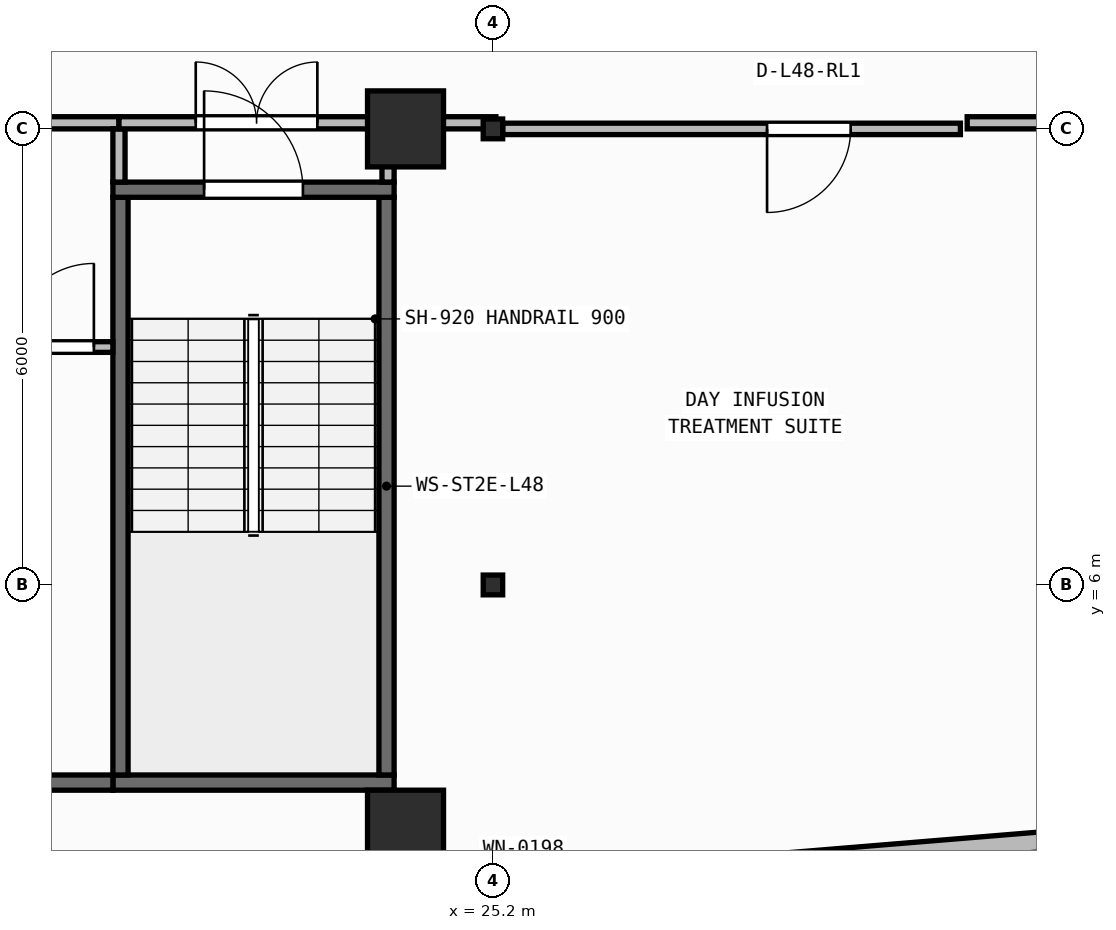
"""IFC4 building model, lengths in metres.
Left out: names, types, materials, properties, quantities, classifications, styles, units other than length and angle.
Written with IfcOpenShell. Run it as: python <this file> out.ifc"""

import sys

from ifc_helpers import new_model, si_unit, direction, frame, frame_2d, origin, origin_2d, place, context, subcontext, project, spatial, rectangle, i_section, extrude, element, fill, save


model = new_model("IFC4")
c1 = context("Model", 3, precision=1e-05, world=origin(), true_north=direction((0.0, 1.0)))
c2 = subcontext(c1, "Body", "Model", "MODEL_VIEW")
j1 = project(units=[si_unit("LENGTHUNIT", "METRE"), si_unit("PLANEANGLEUNIT", "RADIAN")], contexts=[c1])
p1 = place(None, origin())
s1 = spatial("IfcSite", under=j1, at=p1, CompositionType="ELEMENT")
p2 = place(p1, origin())
s2 = spatial("IfcBuilding", under=s1, at=p2, CompositionType="ELEMENT")
p3 = place(p2, frame((0.0, 0.0, 196.05)))
s3 = spatial("IfcBuildingStorey", under=s2, at=p3, CompositionType="ELEMENT", Elevation=196.05)
p4 = place(p3, frame((24.05, 2.8, 0.0), z_axis=(0.0, 0.0, 1.0), x_axis=(1.0, 0.0, 0.0)))
e1 = element("IfcColumn", 1, at=p4, inside=s3, PredefinedType="COLUMN", context=c2, shape_type="SweptSolid", body=[
    extrude(rectangle(XDim=1.0, YDim=1.0, at=origin_2d()), origin(), (0.0, 0.0, 1.0), 3.95),
])
p5 = place(p3, frame((25.2, 6.0, 0.0), z_axis=(0.0, 0.0, 1.0), x_axis=(1.0, 0.0, 0.0)))
e2 = element("IfcColumn", 2, at=p5, inside=s3, PredefinedType="COLUMN", context=c2, shape_type="SweptSolid", body=[
    extrude(i_section(OverallWidth=0.256, OverallDepth=0.26, WebThickness=0.01, FlangeThickness=0.017, FilletRadius=0.013, at=origin_2d()), origin(), (0.0, 0.0, 1.0), 3.95),
])
p6 = place(p3, frame((24.05, 12.0, 0.0), z_axis=(0.0, 0.0, 1.0), x_axis=(1.0, 0.0, 0.0)))
e3 = element("IfcColumn", 3, at=p6, inside=s3, PredefinedType="COLUMN", context=c2, shape_type="SweptSolid", body=[
    extrude(rectangle(XDim=1.0, YDim=1.0, at=origin_2d()), origin(), (0.0, 0.0, 1.0), 3.95),
])
p7 = place(p3, frame((25.2, 12.0, 0.0), z_axis=(0.0, 0.0, 1.0), x_axis=(1.0, 0.0, 0.0)))
e4 = element("IfcColumn", 4, at=p7, inside=s3, PredefinedType="COLUMN", context=c2, shape_type="SweptSolid", body=[
    extrude(i_section(OverallWidth=0.256, OverallDepth=0.26, WebThickness=0.01, FlangeThickness=0.017, FilletRadius=0.013, at=origin_2d()), origin(), (0.0, 0.0, 1.0), 3.95),
])
p8 = place(p3, frame((2.66, 0.174, 0.0), z_axis=(0.0, 0.0, 1.0), x_axis=(0.996634028439, 0.081979347142, 0.0)))
e5 = element("IfcWall", 5, at=p8, inside=s3, PredefinedType="STANDARD", context=c2, shape_type="SweptSolid", body=[
    extrude(rectangle(XDim=46.035, YDim=0.26, at=frame_2d((23.018, 0.0))), origin(), (0.0, 0.0, 1.0), 3.71),
])
p9 = place(p8, frame((21.817, 0.0, 0.9)))
e6 = element("IfcOpeningElement", 6, at=p9, cuts=e5, PredefinedType="OPENING", context=c2, shape_type="SweptSolid", body=[
    extrude(rectangle(XDim=2.4, YDim=1.65, at=frame_2d((1.2, 0.825))), frame((0.0, 0.14, 0.0), z_axis=(0.0, -1.0, 0.0), x_axis=(1.0, 0.0, 0.0)), (0.0, 0.0, 1.0), 0.28),
])
p10 = place(p3, frame((20.2, 3.4, 0.0), z_axis=(0.0, 0.0, 1.0), x_axis=(1.0, 0.0, 0.0)))
e7 = element("IfcWall", 7, at=p10, inside=s3, PredefinedType="SHEAR", context=c2, shape_type="SweptSolid", body=[
    extrude(rectangle(XDim=3.7, YDim=0.2, at=frame_2d((1.85, 0.0))), origin(), (0.0, 0.0, 1.0), 3.71),
])
for number, where, z_axis, x_axis in (
    (8, (20.3, 3.5, 0.0), (0.0, 0.0, 1.0), (0.0, 1.0, 0.0)),
    (9, (23.8, 3.5, 0.0), (0.0, 0.0, 1.0), (0.0, 1.0, 0.0)),
):
    element("IfcWall", number, at=place(p3, frame(where, z_axis=z_axis, x_axis=x_axis)), inside=s3, PredefinedType="SHEAR", context=c2, shape_type="SweptSolid", body=[
        extrude(rectangle(XDim=7.6, YDim=0.2, at=frame_2d((3.8, 0.0))), origin(), (0.0, 0.0, 1.0), 3.71),
    ])
p11 = place(p3, frame((20.2, 11.2, 0.0), z_axis=(0.0, 0.0, 1.0), x_axis=(1.0, 0.0, 0.0)))
e10 = element("IfcWall", 10, at=p11, inside=s3, PredefinedType="SHEAR", context=c2, shape_type="SweptSolid", body=[
    extrude(rectangle(XDim=3.7, YDim=0.2, at=frame_2d((1.85, 0.0))), origin(), (0.0, 0.0, 1.0), 3.71),
])
p12 = place(p11, frame((1.2, 0.0, 0.0)))
e11 = element("IfcOpeningElement", 11, at=p12, cuts=e10, PredefinedType="OPENING", context=c2, shape_type="SweptSolid", body=[
    extrude(rectangle(XDim=1.3, YDim=2.15, at=frame_2d((0.65, 1.075))), frame((0.0, 0.11, 0.0), z_axis=(0.0, -1.0, 0.0), x_axis=(1.0, 0.0, 0.0)), (0.0, 0.0, 1.0), 0.22),
])
p13 = place(p3, frame((6.5, 3.4, 0.0), z_axis=(0.0, 0.0, 1.0), x_axis=(1.0, 0.0, 0.0)))
e12 = element("IfcWall", 12, at=p13, inside=s3, PredefinedType="SHEAR", context=c2, shape_type="SweptSolid", body=[
    extrude(rectangle(XDim=13.7, YDim=0.2, at=frame_2d((6.85, 0.0))), origin(), (0.0, 0.0, 1.0), 3.71),
])
p14 = place(p3, frame((18.61, 9.13, 0.0), z_axis=(0.0, 0.0, 1.0), x_axis=(1.0, 0.0, 0.0)))
e13 = element("IfcWall", 13, at=p14, inside=s3, PredefinedType="PARTITIONING", context=c2, shape_type="SweptSolid", body=[
    extrude(rectangle(XDim=1.59, YDim=0.14, at=frame_2d((0.795, 0.0))), origin(), (0.0, 0.0, 1.0), 3.71),
])
p15 = place(p14, frame((0.24, 0.0, 0.0)))
e14 = element("IfcOpeningElement", 14, at=p15, cuts=e13, PredefinedType="OPENING", context=c2, shape_type="SweptSolid", body=[
    extrude(rectangle(XDim=1.1, YDim=2.1, at=frame_2d((0.55, 1.05))), frame((0.0, 0.08, 0.0), z_axis=(0.0, -1.0, 0.0), x_axis=(1.0, 0.0, 0.0)), (0.0, 0.0, 1.0), 0.16),
])
p16 = place(p3, frame((12.58, 12.08, 0.0), z_axis=(0.0, 0.0, 1.0), x_axis=(1.0, 0.0, 0.0)))
e15 = element("IfcWall", 15, at=p16, inside=s3, PredefinedType="PARTITIONING", context=c2, shape_type="SweptSolid", body=[
    extrude(rectangle(XDim=7.7, YDim=0.16, at=frame_2d((3.85, 0.0))), origin(), (0.0, 0.0, 1.0), 3.152),
])
p17 = place(p16, frame((3.05, 0.0, 0.0)))
e16 = element("IfcOpeningElement", 16, at=p17, cuts=e15, PredefinedType="OPENING", context=c2, shape_type="SweptSolid", body=[
    extrude(rectangle(XDim=1.6, YDim=2.05, at=frame_2d((0.8, 1.025))), frame((0.0, 0.09, 0.0), z_axis=(0.0, -1.0, 0.0), x_axis=(1.0, 0.0, 0.0)), (0.0, 0.0, 1.0), 0.18),
])
p18 = place(p3, frame((20.28, 11.3, 0.0), z_axis=(0.0, 0.0, 1.0), x_axis=(0.0, 1.0, 0.0)))
e17 = element("IfcWall", 17, at=p18, inside=s3, PredefinedType="PARTITIONING", context=c2, shape_type="SweptSolid", body=[
    extrude(rectangle(XDim=0.7, YDim=0.16, at=frame_2d((0.35, 0.0))), origin(), (0.0, 0.0, 1.0), 3.71),
])
p19 = place(p3, frame((20.28, 12.08, 0.0), z_axis=(0.0, 0.0, 1.0), x_axis=(1.0, 0.0, 0.0)))
e18 = element("IfcWall", 18, at=p19, inside=s3, PredefinedType="PARTITIONING", context=c2, shape_type="SweptSolid", body=[
    extrude(rectangle(XDim=3.62, YDim=0.16, at=frame_2d((1.81, 0.0))), origin(), (0.0, 0.0, 1.0), 3.152),
])
p20 = place(p19, frame((1.01, 0.0, 0.0)))
e19 = element("IfcOpeningElement", 19, at=p20, cuts=e18, PredefinedType="OPENING", context=c2, shape_type="SweptSolid", body=[
    extrude(rectangle(XDim=1.6, YDim=2.05, at=frame_2d((0.8, 1.025))), frame((0.0, 0.09, 0.0), z_axis=(0.0, -1.0, 0.0), x_axis=(1.0, 0.0, 0.0)), (0.0, 0.0, 1.0), 0.18),
])
p21 = place(p3, frame((23.82, 11.3, 0.0), z_axis=(0.0, 0.0, 1.0), x_axis=(0.0, 1.0, 0.0)))
e20 = element("IfcWall", 20, at=p21, inside=s3, PredefinedType="PARTITIONING", context=c2, shape_type="SweptSolid", body=[
    extrude(rectangle(XDim=0.7, YDim=0.16, at=frame_2d((0.35, 0.0))), origin(), (0.0, 0.0, 1.0), 3.71),
])
p22 = place(p3, frame((31.35, 12.0, 0.0), z_axis=(0.0, 0.0, 1.0), x_axis=(-1.0, 0.0, 0.0)))
e21 = element("IfcWall", 21, at=p22, inside=s3, PredefinedType="PARTITIONING", context=c2, shape_type="SweptSolid", body=[
    extrude(rectangle(XDim=6.022, YDim=0.15, at=frame_2d((3.011, 0.0))), origin(), (0.0, 0.0, 1.0), 3.152),
])
p23 = place(p22, frame((1.444, 0.0, 0.0)))
e22 = element("IfcOpeningElement", 22, at=p23, cuts=e21, PredefinedType="OPENING", context=c2, shape_type="SweptSolid", body=[
    extrude(rectangle(XDim=1.1, YDim=2.1, at=frame_2d((0.55, 1.05))), frame((0.0, 0.085, 0.0), z_axis=(0.0, -1.0, 0.0), x_axis=(1.0, 0.0, 0.0)), (0.0, 0.0, 1.0), 0.17),
])
p24 = place(p3, frame((24.02, 12.08, 0.0), z_axis=(0.0, 0.0, 1.0), x_axis=(1.0, 0.0, 0.0)))
e23 = element("IfcWall", 23, at=p24, inside=s3, PredefinedType="PARTITIONING", context=c2, shape_type="SweptSolid", body=[
    extrude(rectangle(XDim=1.219, YDim=0.16, at=frame_2d((0.609, 0.0))), origin(), (0.0, 0.0, 1.0), 3.152),
])
p25 = place(p3, frame((31.439, 12.08, 0.0), z_axis=(0.0, 0.0, 1.0), x_axis=(1.0, 0.0, 0.0)))
e24 = element("IfcWall", 24, at=p25, inside=s3, PredefinedType="PARTITIONING", context=c2, shape_type="SweptSolid", body=[
    extrude(rectangle(XDim=2.199, YDim=0.16, at=frame_2d((1.1, 0.0))), origin(), (0.0, 0.0, 1.0), 3.152),
])
p26 = place(p12, origin())
e25 = element("IfcDoor", 25, at=p26, inside=s3, OperationType="SINGLE_SWING_LEFT", PredefinedType="DOOR", context=c2, shape_type="SweptSolid", body=[
    extrude(rectangle(XDim=1.3, YDim=2.15, at=frame_2d((0.65, 1.075))), frame((0.0, 0.025, 0.0), z_axis=(0.0, -1.0, 0.0), x_axis=(1.0, 0.0, 0.0)), (0.0, 0.0, 1.0), 0.05),
])
fill(e11, e25)
p27 = place(p15, origin())
e26 = element("IfcDoor", 26, at=p27, inside=s3, OperationType="SINGLE_SWING_RIGHT", PredefinedType="DOOR", context=c2, shape_type="SweptSolid", body=[
    extrude(rectangle(XDim=1.1, YDim=2.1, at=frame_2d((0.55, 1.05))), frame((0.0, 0.025, 0.0), z_axis=(0.0, -1.0, 0.0), x_axis=(1.0, 0.0, 0.0)), (0.0, 0.0, 1.0), 0.05),
])
fill(e14, e26)
p28 = place(p20, origin())
e27 = element("IfcDoor", 27, at=p28, inside=s3, OperationType="DOUBLE_DOOR_SINGLE_SWING", PredefinedType="DOOR", context=c2, shape_type="SweptSolid", body=[
    extrude(rectangle(XDim=1.6, YDim=2.05, at=frame_2d((0.8, 1.025))), frame((0.0, 0.025, 0.0), z_axis=(0.0, -1.0, 0.0), x_axis=(1.0, 0.0, 0.0)), (0.0, 0.0, 1.0), 0.05),
])
fill(e19, e27)
p29 = place(p23, origin())
e28 = element("IfcDoor", 28, at=p29, inside=s3, OperationType="SINGLE_SWING_RIGHT", PredefinedType="DOOR", context=c2, shape_type="SweptSolid", body=[
    extrude(rectangle(XDim=1.1, YDim=2.1, at=frame_2d((0.55, 1.05))), frame((0.0, 0.025, 0.0), z_axis=(0.0, -1.0, 0.0), x_axis=(1.0, 0.0, 0.0)), (0.0, 0.0, 1.0), 0.05),
])
fill(e22, e28)
save(model, sys.argv[1])
